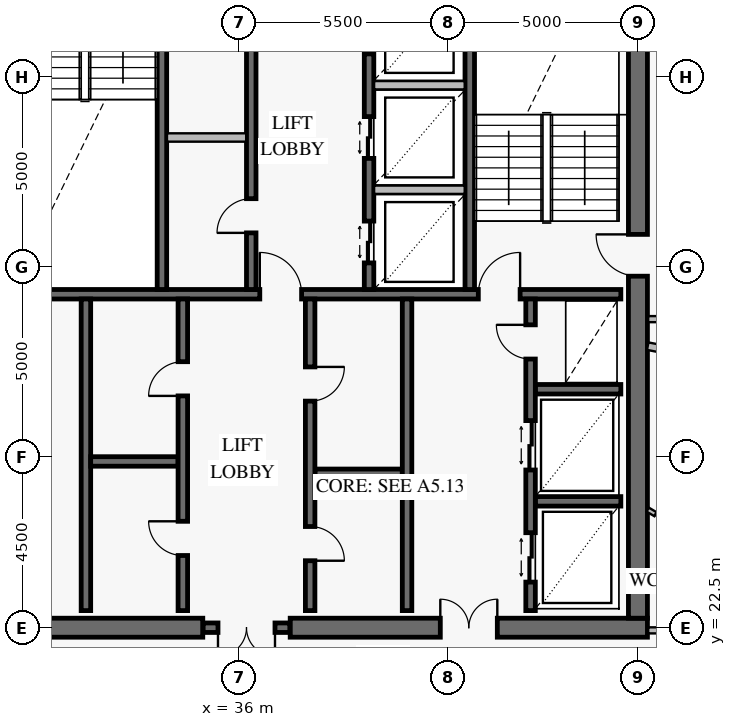
"""IFC4 building model, lengths in metres.
Left out: names, types, materials, properties, quantities, classifications, styles, units other than length and angle.
Written with IfcOpenShell. Run it as: python <this file> out.ifc"""

import sys

from ifc_helpers import new_model, si_unit, direction, frame, frame_2d, origin, place, context, subcontext, project, spatial, rectangle, extrude, element, fill, save


model = new_model("IFC4")
c1 = context("Model", 3, precision=1e-05, world=origin(), true_north=direction((0.0, 1.0)))
c2 = subcontext(c1, "Body", "Model", "MODEL_VIEW")
j1 = project(units=[si_unit("LENGTHUNIT", "METRE"), si_unit("PLANEANGLEUNIT", "RADIAN")], contexts=[c1])
p1 = place(None, origin())
s1 = spatial("IfcSite", under=j1, at=p1, CompositionType="ELEMENT")
p2 = place(p1, origin())
s2 = spatial("IfcBuilding", under=s1, at=p2, CompositionType="ELEMENT")
p3 = place(p2, frame((0.0, 0.0, 331.0)))
s3 = spatial("IfcBuildingStorey", under=s2, at=p3, CompositionType="ELEMENT", Elevation=331.0)
p4 = place(p3, frame((25.25, 22.5, 0.0), z_axis=(0.0, 0.0, 1.0), x_axis=(1.0, 0.0, 0.0)))
e1 = element("IfcWall", 1, at=p4, inside=s3, PredefinedType="SHEAR", context=c2, shape_type="SweptSolid", body=[
    extrude(rectangle(XDim=9.8, YDim=0.5, at=frame_2d((4.9, 0.0))), origin(), (0.0, 0.0, 1.0), 3.8),
])
p5 = place(p4, frame((4.15, 0.0, 0.0)))
e2 = element("IfcOpeningElement", 2, at=p5, cuts=e1, PredefinedType="OPENING", context=c2, shape_type="SweptSolid", body=[
    extrude(rectangle(XDim=1.5, YDim=2.15, at=frame_2d((0.75, 1.075))), frame((0.0, 0.262, 0.0), z_axis=(0.0, -1.0, 0.0), x_axis=(1.0, 0.0, 0.0)), (0.0, 0.0, 1.0), 0.524),
])
p6 = place(p3, frame((37.35, 22.5, 0.0), z_axis=(0.0, 0.0, 1.0), x_axis=(1.0, 0.0, 0.0)))
e3 = element("IfcWall", 3, at=p6, inside=s3, PredefinedType="SHEAR", context=c2, shape_type="SweptSolid", body=[
    extrude(rectangle(XDim=9.4, YDim=0.5, at=frame_2d((4.7, 0.0))), origin(), (0.0, 0.0, 1.0), 3.8),
])
p7 = place(p6, frame((3.95, 0.0, 0.0)))
e4 = element("IfcOpeningElement", 4, at=p7, cuts=e3, PredefinedType="OPENING", context=c2, shape_type="SweptSolid", body=[
    extrude(rectangle(XDim=1.5, YDim=2.15, at=frame_2d((0.75, 1.075))), frame((0.0, 0.262, 0.0), z_axis=(0.0, -1.0, 0.0), x_axis=(1.0, 0.0, 0.0)), (0.0, 0.0, 1.0), 0.524),
])
p8 = place(p3, frame((46.5, 22.75, 0.0), z_axis=(0.0, 0.0, 1.0), x_axis=(0.0, 1.0, 0.0)))
e5 = element("IfcWall", 5, at=p8, inside=s3, PredefinedType="SHEAR", context=c2, shape_type="SweptSolid", body=[
    extrude(rectangle(XDim=18.5, YDim=0.5, at=frame_2d((9.25, 0.0))), origin(), (0.0, 0.0, 1.0), 3.8),
])
p9 = place(p8, frame((9.0, 0.0, 0.0)))
e6 = element("IfcOpeningElement", 6, at=p9, cuts=e5, PredefinedType="OPENING", context=c2, shape_type="SweptSolid", body=[
    extrude(rectangle(XDim=1.1, YDim=2.15, at=frame_2d((0.55, 1.075))), frame((0.0, 0.262, 0.0), z_axis=(0.0, -1.0, 0.0), x_axis=(1.0, 0.0, 0.0)), (0.0, 0.0, 1.0), 0.524),
])
p10 = place(p3, frame((35.06, 22.5, 0.0), z_axis=(0.0, 0.0, 1.0), x_axis=(1.0, 0.0, 0.0)))
e7 = element("IfcWall", 7, at=p10, inside=s3, PredefinedType="SOLIDWALL", context=c2, shape_type="SweptSolid", body=[
    extrude(rectangle(XDim=2.28, YDim=0.25, at=frame_2d((1.14, 0.0))), origin(), (0.0, 0.0, 1.0), 3.8),
])
p11 = place(p10, frame((0.39, 0.0, 0.0)))
e8 = element("IfcOpeningElement", 8, at=p11, cuts=e7, PredefinedType="OPENING", context=c2, shape_type="SweptSolid", body=[
    extrude(rectangle(XDim=1.5, YDim=2.15, at=frame_2d((0.75, 1.075))), frame((0.0, 0.137, 0.0), z_axis=(0.0, -1.0, 0.0), x_axis=(1.0, 0.0, 0.0)), (0.0, 0.0, 1.0), 0.274),
])
p12 = place(p3, frame((25.95, 31.275, 0.0), z_axis=(0.0, 0.0, 1.0), x_axis=(1.0, 0.0, 0.0)))
e9 = element("IfcWall", 9, at=p12, inside=s3, PredefinedType="SOLIDWALL", context=c2, shape_type="SweptSolid", body=[
    extrude(rectangle(XDim=20.1, YDim=0.25, at=frame_2d((10.05, 0.0))), origin(), (0.0, 0.0, 1.0), 3.8),
])
p13 = place(p12, frame((2.6, 0.0, 0.0)))
e10 = element("IfcOpeningElement", 10, at=p13, cuts=e9, PredefinedType="OPENING", context=c2, shape_type="SweptSolid", body=[
    extrude(rectangle(XDim=1.1, YDim=2.15, at=frame_2d((0.55, 1.075))), frame((0.0, 0.137, 0.0), z_axis=(0.0, -1.0, 0.0), x_axis=(1.0, 0.0, 0.0)), (0.0, 0.0, 1.0), 0.274),
])
p14 = place(p12, frame((10.6, 0.0, 0.0)))
e11 = element("IfcOpeningElement", 11, at=p14, cuts=e9, PredefinedType="OPENING", context=c2, shape_type="SweptSolid", body=[
    extrude(rectangle(XDim=1.1, YDim=2.15, at=frame_2d((0.55, 1.075))), frame((0.0, 0.137, 0.0), z_axis=(0.0, -1.0, 0.0), x_axis=(1.0, 0.0, 0.0)), (0.0, 0.0, 1.0), 0.274),
])
p15 = place(p12, frame((16.35, 0.0, 0.0)))
e12 = element("IfcOpeningElement", 12, at=p15, cuts=e9, PredefinedType="OPENING", context=c2, shape_type="SweptSolid", body=[
    extrude(rectangle(XDim=1.1, YDim=2.15, at=frame_2d((0.55, 1.075))), frame((0.0, 0.137, 0.0), z_axis=(0.0, -1.0, 0.0), x_axis=(1.0, 0.0, 0.0)), (0.0, 0.0, 1.0), 0.274),
])
for number, where, z_axis, x_axis in (
    (13, (33.975, 31.4, 0.0), (0.0, 0.0, 1.0), (0.0, 1.0, 0.0)),
    (14, (42.075, 31.4, 0.0), (0.0, 0.0, 1.0), (0.0, 1.0, 0.0)),
):
    element("IfcWall", number, at=place(p3, frame(where, z_axis=z_axis, x_axis=x_axis)), inside=s3, PredefinedType="SOLIDWALL", context=c2, shape_type="SweptSolid", body=[
        extrude(rectangle(XDim=9.7, YDim=0.25, at=frame_2d((4.85, 0.0))), origin(), (0.0, 0.0, 1.0), 3.8),
    ])
p16 = place(p3, frame((36.325, 31.4, 0.0), z_axis=(0.0, 0.0, 1.0), x_axis=(0.0, 1.0, 0.0)))
e15 = element("IfcWall", 15, at=p16, inside=s3, PredefinedType="SOLIDWALL", context=c2, shape_type="SweptSolid", body=[
    extrude(rectangle(XDim=9.65, YDim=0.25, at=frame_2d((4.825, 0.0))), origin(), (0.0, 0.0, 1.0), 3.8),
])
p17 = place(p16, frame((1.49, 0.0, 0.0)))
e16 = element("IfcOpeningElement", 16, at=p17, cuts=e15, PredefinedType="OPENING", context=c2, shape_type="SweptSolid", body=[
    extrude(rectangle(XDim=0.9, YDim=2.1, at=frame_2d((0.45, 1.05))), frame((0.0, 0.137, 0.0), z_axis=(0.0, -1.0, 0.0), x_axis=(1.0, 0.0, 0.0)), (0.0, 0.0, 1.0), 0.274),
])
p18 = place(p16, frame((6.41, 0.0, 0.0)))
e17 = element("IfcOpeningElement", 17, at=p18, cuts=e15, PredefinedType="OPENING", context=c2, shape_type="SweptSolid", body=[
    extrude(rectangle(XDim=0.9, YDim=2.1, at=frame_2d((0.45, 1.05))), frame((0.0, 0.137, 0.0), z_axis=(0.0, -1.0, 0.0), x_axis=(1.0, 0.0, 0.0)), (0.0, 0.0, 1.0), 0.274),
])
p19 = place(p3, frame((39.425, 31.4, 0.0), z_axis=(0.0, 0.0, 1.0), x_axis=(0.0, 1.0, 0.0)))
e18 = element("IfcWall", 18, at=p19, inside=s3, PredefinedType="SOLIDWALL", context=c2, shape_type="SweptSolid", body=[
    extrude(rectangle(XDim=9.65, YDim=0.25, at=frame_2d((4.825, 0.0))), origin(), (0.0, 0.0, 1.0), 3.8),
])
p20 = place(p19, frame((0.7, 0.0, 0.0)))
e19 = element("IfcOpeningElement", 19, at=p20, cuts=e18, PredefinedType="OPENING", context=c2, shape_type="SweptSolid", body=[
    extrude(rectangle(XDim=1.1, YDim=2.2, at=frame_2d((0.55, 1.1))), frame((0.0, 0.137, 0.0), z_axis=(0.0, -1.0, 0.0), x_axis=(1.0, 0.0, 0.0)), (0.0, 0.0, 1.0), 0.274),
])
p21 = place(p19, frame((3.45, 0.0, 0.0)))
e20 = element("IfcOpeningElement", 20, at=p21, cuts=e18, PredefinedType="OPENING", context=c2, shape_type="SweptSolid", body=[
    extrude(rectangle(XDim=1.1, YDim=2.2, at=frame_2d((0.55, 1.1))), frame((0.0, 0.137, 0.0), z_axis=(0.0, -1.0, 0.0), x_axis=(1.0, 0.0, 0.0)), (0.0, 0.0, 1.0), 0.274),
])
p22 = place(p19, frame((6.2, 0.0, 0.0)))
e21 = element("IfcOpeningElement", 21, at=p22, cuts=e18, PredefinedType="OPENING", context=c2, shape_type="SweptSolid", body=[
    extrude(rectangle(XDim=1.1, YDim=2.2, at=frame_2d((0.55, 1.1))), frame((0.0, 0.137, 0.0), z_axis=(0.0, -1.0, 0.0), x_axis=(1.0, 0.0, 0.0)), (0.0, 0.0, 1.0), 0.274),
])
p23 = place(p19, frame((8.47, 0.0, 0.0)))
e22 = element("IfcOpeningElement", 22, at=p23, cuts=e18, PredefinedType="OPENING", context=c2, shape_type="SweptSolid", body=[
    extrude(rectangle(XDim=0.9, YDim=2.1, at=frame_2d((0.45, 1.05))), frame((0.0, 0.137, 0.0), z_axis=(0.0, -1.0, 0.0), x_axis=(1.0, 0.0, 0.0)), (0.0, 0.0, 1.0), 0.274),
])
p24 = place(p3, frame((31.975, 22.95, 0.0), z_axis=(0.0, 0.0, 1.0), x_axis=(0.0, 1.0, 0.0)))
e23 = element("IfcWall", 23, at=p24, inside=s3, PredefinedType="SOLIDWALL", context=c2, shape_type="SweptSolid", body=[
    extrude(rectangle(XDim=8.2, YDim=0.25, at=frame_2d((4.1, 0.0))), origin(), (0.0, 0.0, 1.0), 3.8),
])
p25 = place(p3, frame((32.1, 26.875, 0.0), z_axis=(0.0, 0.0, 1.0), x_axis=(1.0, 0.0, 0.0)))
e24 = element("IfcWall", 24, at=p25, inside=s3, PredefinedType="SOLIDWALL", context=c2, shape_type="SweptSolid", body=[
    extrude(rectangle(XDim=2.3, YDim=0.25, at=frame_2d((1.15, 0.0))), origin(), (0.0, 0.0, 1.0), 3.8),
])
p26 = place(p3, frame((34.525, 22.95, 0.0), z_axis=(0.0, 0.0, 1.0), x_axis=(0.0, 1.0, 0.0)))
e25 = element("IfcWall", 25, at=p26, inside=s3, PredefinedType="SOLIDWALL", context=c2, shape_type="SweptSolid", body=[
    extrude(rectangle(XDim=8.2, YDim=0.25, at=frame_2d((4.1, 0.0))), origin(), (0.0, 0.0, 1.0), 3.8),
])
p27 = place(p26, frame((1.45, 0.0, 0.0)))
e26 = element("IfcOpeningElement", 26, at=p27, cuts=e25, PredefinedType="OPENING", context=c2, shape_type="SweptSolid", body=[
    extrude(rectangle(XDim=0.9, YDim=2.1, at=frame_2d((0.45, 1.05))), frame((0.0, 0.137, 0.0), z_axis=(0.0, -1.0, 0.0), x_axis=(1.0, 0.0, 0.0)), (0.0, 0.0, 1.0), 0.274),
])
p28 = place(p26, frame((5.65, 0.0, 0.0)))
e27 = element("IfcOpeningElement", 27, at=p28, cuts=e25, PredefinedType="OPENING", context=c2, shape_type="SweptSolid", body=[
    extrude(rectangle(XDim=0.9, YDim=2.1, at=frame_2d((0.45, 1.05))), frame((0.0, 0.137, 0.0), z_axis=(0.0, -1.0, 0.0), x_axis=(1.0, 0.0, 0.0)), (0.0, 0.0, 1.0), 0.274),
])
p29 = place(p3, frame((38.0, 26.55, 0.0), z_axis=(0.0, 0.0, 1.0), x_axis=(1.0, 0.0, 0.0)))
e28 = element("IfcWall", 28, at=p29, inside=s3, PredefinedType="SOLIDWALL", context=c2, shape_type="SweptSolid", body=[
    extrude(rectangle(XDim=2.3, YDim=0.25, at=frame_2d((1.15, 0.0))), origin(), (0.0, 0.0, 1.0), 3.8),
])
p30 = place(p3, frame((37.875, 22.95, 0.0), z_axis=(0.0, 0.0, 1.0), x_axis=(0.0, 1.0, 0.0)))
e29 = element("IfcWall", 29, at=p30, inside=s3, PredefinedType="SOLIDWALL", context=c2, shape_type="SweptSolid", body=[
    extrude(rectangle(XDim=8.2, YDim=0.25, at=frame_2d((4.1, 0.0))), origin(), (0.0, 0.0, 1.0), 3.8),
])
p31 = place(p30, frame((1.312, 0.0, 0.0)))
e30 = element("IfcOpeningElement", 30, at=p31, cuts=e29, PredefinedType="OPENING", context=c2, shape_type="SweptSolid", body=[
    extrude(rectangle(XDim=0.9, YDim=2.1, at=frame_2d((0.45, 1.05))), frame((0.0, 0.137, 0.0), z_axis=(0.0, -1.0, 0.0), x_axis=(1.0, 0.0, 0.0)), (0.0, 0.0, 1.0), 0.274),
])
p32 = place(p30, frame((5.512, 0.0, 0.0)))
e31 = element("IfcOpeningElement", 31, at=p32, cuts=e29, PredefinedType="OPENING", context=c2, shape_type="SweptSolid", body=[
    extrude(rectangle(XDim=0.9, YDim=2.1, at=frame_2d((0.45, 1.05))), frame((0.0, 0.137, 0.0), z_axis=(0.0, -1.0, 0.0), x_axis=(1.0, 0.0, 0.0)), (0.0, 0.0, 1.0), 0.274),
])
p33 = place(p3, frame((40.425, 22.95, 0.0), z_axis=(0.0, 0.0, 1.0), x_axis=(0.0, 1.0, 0.0)))
e32 = element("IfcWall", 32, at=p33, inside=s3, PredefinedType="SOLIDWALL", context=c2, shape_type="SweptSolid", body=[
    extrude(rectangle(XDim=8.2, YDim=0.25, at=frame_2d((4.1, 0.0))), origin(), (0.0, 0.0, 1.0), 3.8),
])
for number, where, z_axis, x_axis in (
    (33, (43.8, 25.825, 0.0), (0.0, 0.0, 1.0), (1.0, 0.0, 0.0)),
    (34, (43.8, 28.775, 0.0), (0.0, 0.0, 1.0), (1.0, 0.0, 0.0)),
):
    element("IfcWall", number, at=place(p3, frame(where, z_axis=z_axis, x_axis=x_axis)), inside=s3, PredefinedType="SOLIDWALL", context=c2, shape_type="SweptSolid", body=[
        extrude(rectangle(XDim=2.25, YDim=0.25, at=frame_2d((1.125, 0.0))), origin(), (0.0, 0.0, 1.0), 3.8),
    ])
p34 = place(p3, frame((43.675, 22.95, 0.0), z_axis=(0.0, 0.0, 1.0), x_axis=(0.0, 1.0, 0.0)))
e35 = element("IfcWall", 35, at=p34, inside=s3, PredefinedType="SOLIDWALL", context=c2, shape_type="SweptSolid", body=[
    extrude(rectangle(XDim=8.2, YDim=0.25, at=frame_2d((4.1, 0.0))), origin(), (0.0, 0.0, 1.0), 3.8),
])
p35 = place(p34, frame((0.75, 0.0, 0.0)))
e36 = element("IfcOpeningElement", 36, at=p35, cuts=e35, PredefinedType="OPENING", context=c2, shape_type="SweptSolid", body=[
    extrude(rectangle(XDim=1.3, YDim=2.3, at=frame_2d((0.65, 1.15))), frame((0.0, 0.137, 0.0), z_axis=(0.0, -1.0, 0.0), x_axis=(1.0, 0.0, 0.0)), (0.0, 0.0, 1.0), 0.274),
])
p36 = place(p34, frame((3.7, 0.0, 0.0)))
e37 = element("IfcOpeningElement", 37, at=p36, cuts=e35, PredefinedType="OPENING", context=c2, shape_type="SweptSolid", body=[
    extrude(rectangle(XDim=1.3, YDim=2.3, at=frame_2d((0.65, 1.15))), frame((0.0, 0.137, 0.0), z_axis=(0.0, -1.0, 0.0), x_axis=(1.0, 0.0, 0.0)), (0.0, 0.0, 1.0), 0.274),
])
p37 = place(p34, frame((6.62, 0.0, 0.0)))
e38 = element("IfcOpeningElement", 38, at=p37, cuts=e35, PredefinedType="OPENING", context=c2, shape_type="SweptSolid", body=[
    extrude(rectangle(XDim=0.9, YDim=2.1, at=frame_2d((0.45, 1.05))), frame((0.0, 0.137, 0.0), z_axis=(0.0, -1.0, 0.0), x_axis=(1.0, 0.0, 0.0)), (0.0, 0.0, 1.0), 0.274),
])
p38 = place(p3, frame((46.758, 25.607, 0.0), z_axis=(0.0, 0.0, 1.0), x_axis=(0.859597506205, -0.51097174807, 0.0)))
e39 = element("IfcWall", 39, at=p38, inside=s3, PredefinedType="PARTITIONING", context=c2, shape_type="SweptSolid", body=[
    extrude(rectangle(XDim=1.693, YDim=0.12, at=frame_2d((0.847, 0.0))), origin(), (0.0, 0.0, 1.0), 3.55),
])
p39 = place(p38, frame((0.239, 0.0, 0.0)))
e40 = element("IfcOpeningElement", 40, at=p39, cuts=e39, PredefinedType="OPENING", context=c2, shape_type="SweptSolid", body=[
    extrude(rectangle(XDim=0.9, YDim=2.1, at=frame_2d((0.45, 1.05))), frame((0.0, 0.072, 0.0), z_axis=(0.0, -1.0, 0.0), x_axis=(1.0, 0.0, 0.0)), (0.0, 0.0, 1.0), 0.144),
])
p40 = place(p3, frame((46.77, 30.62, 0.0), z_axis=(0.0, 0.0, 1.0), x_axis=(1.0, 0.0, 0.0)))
e41 = element("IfcWall", 41, at=p40, inside=s3, PredefinedType="PARTITIONING", context=c2, shape_type="SweptSolid", body=[
    extrude(rectangle(XDim=2.029, YDim=0.16, at=frame_2d((1.015, 0.0))), origin(), (0.0, 0.0, 1.0), 3.55),
])
p41 = place(p40, frame((0.49, 0.0, 0.0)))
e42 = element("IfcOpeningElement", 42, at=p41, cuts=e41, PredefinedType="OPENING", context=c2, shape_type="SweptSolid", body=[
    extrude(rectangle(XDim=1.05, YDim=2.15, at=frame_2d((0.525, 1.075))), frame((0.0, 0.092, 0.0), z_axis=(0.0, -1.0, 0.0), x_axis=(1.0, 0.0, 0.0)), (0.0, 0.0, 1.0), 0.184),
])
p42 = place(p3, frame((34.108, 35.4, 0.0), z_axis=(0.0, 0.0, 1.0), x_axis=(1.0, 0.0, 0.0)))
e43 = element("IfcWall", 43, at=p42, inside=s3, PredefinedType="PARTITIONING", context=c2, shape_type="SweptSolid", body=[
    extrude(rectangle(XDim=2.084, YDim=0.22, at=frame_2d((1.042, 0.0))), origin(), (0.0, 0.0, 1.0), 3.55),
])
for number, where, z_axis, x_axis in (
    (44, (39.558, 34.025, 0.0), (0.0, 0.0, 1.0), (1.0, 0.0, 0.0)),
    (45, (39.558, 36.775, 0.0), (0.0, 0.0, 1.0), (1.0, 0.0, 0.0)),
):
    element("IfcWall", number, at=place(p3, frame(where, z_axis=z_axis, x_axis=x_axis)), inside=s3, PredefinedType="PARTITIONING", context=c2, shape_type="SweptSolid", body=[
        extrude(rectangle(XDim=2.384, YDim=0.22, at=frame_2d((1.192, 0.0))), origin(), (0.0, 0.0, 1.0), 3.55),
    ])
p43 = place(p3, frame((46.758, 29.909, 0.0), z_axis=(0.0, 0.0, 1.0), x_axis=(0.981626953462, -0.190810178544, 0.0)))
e46 = element("IfcWall", 46, at=p43, inside=s3, PredefinedType="PARTITIONING", context=c2, shape_type="SweptSolid", body=[
    extrude(rectangle(XDim=14.502, YDim=0.2, at=frame_2d((7.251, 0.0))), origin(), (0.0, 0.0, 1.0), 2.97),
])
p44 = place(p3, frame((48.8, 22.43, 0.0), z_axis=(0.0, 0.0, 1.0), x_axis=(-1.0, 0.0, 0.0)))
e47 = element("IfcWall", 47, at=p44, inside=s3, PredefinedType="PARTITIONING", context=c2, shape_type="SweptSolid", body=[
    extrude(rectangle(XDim=2.03, YDim=0.16, at=frame_2d((1.015, 0.0))), origin(), (0.0, 0.0, 1.0), 3.55),
])
p45 = place(p9, origin())
e48 = element("IfcDoor", 48, at=p45, inside=s3, OperationType="SINGLE_SWING_RIGHT", PredefinedType="USERDEFINED", context=c2, shape_type="SweptSolid", body=[
    extrude(rectangle(XDim=1.1, YDim=2.15, at=frame_2d((0.55, 1.075))), frame((0.0, 0.025, 0.0), z_axis=(0.0, -1.0, 0.0), x_axis=(1.0, 0.0, 0.0)), (0.0, 0.0, 1.0), 0.05),
])
fill(e6, e48)
p46 = place(p7, origin())
e49 = element("IfcDoor", 49, at=p46, inside=s3, OperationType="DOUBLE_DOOR_SINGLE_SWING", PredefinedType="DOOR", context=c2, shape_type="SweptSolid", body=[
    extrude(rectangle(XDim=1.5, YDim=2.15, at=frame_2d((0.75, 1.075))), frame((0.0, 0.025, 0.0), z_axis=(0.0, -1.0, 0.0), x_axis=(1.0, 0.0, 0.0)), (0.0, 0.0, 1.0), 0.05),
])
fill(e4, e49)
p47 = place(p11, frame((1.5, 0.0, 0.0), z_axis=(0.0, 0.0, 1.0), x_axis=(-1.0, 0.0, 0.0)))
e50 = element("IfcDoor", 50, at=p47, inside=s3, OperationType="DOUBLE_DOOR_SINGLE_SWING", PredefinedType="DOOR", context=c2, shape_type="SweptSolid", body=[
    extrude(rectangle(XDim=1.5, YDim=2.15, at=frame_2d((0.75, 1.075))), frame((0.0, 0.025, 0.0), z_axis=(0.0, -1.0, 0.0), x_axis=(1.0, 0.0, 0.0)), (0.0, 0.0, 1.0), 0.05),
])
fill(e8, e50)
p48 = place(p14, origin())
e51 = element("IfcDoor", 51, at=p48, inside=s3, OperationType="SINGLE_SWING_LEFT", PredefinedType="USERDEFINED", context=c2, shape_type="SweptSolid", body=[
    extrude(rectangle(XDim=1.1, YDim=2.15, at=frame_2d((0.55, 1.075))), frame((0.0, 0.025, 0.0), z_axis=(0.0, -1.0, 0.0), x_axis=(1.0, 0.0, 0.0)), (0.0, 0.0, 1.0), 0.05),
])
fill(e11, e51)
p49 = place(p15, origin())
e52 = element("IfcDoor", 52, at=p49, inside=s3, OperationType="SINGLE_SWING_RIGHT", PredefinedType="USERDEFINED", context=c2, shape_type="SweptSolid", body=[
    extrude(rectangle(XDim=1.1, YDim=2.15, at=frame_2d((0.55, 1.075))), frame((0.0, 0.025, 0.0), z_axis=(0.0, -1.0, 0.0), x_axis=(1.0, 0.0, 0.0)), (0.0, 0.0, 1.0), 0.05),
])
fill(e12, e52)
p50 = place(p17, origin())
e53 = element("IfcDoor", 53, at=p50, inside=s3, OperationType="SINGLE_SWING_LEFT", PredefinedType="DOOR", context=c2, shape_type="SweptSolid", body=[
    extrude(rectangle(XDim=0.9, YDim=2.1, at=frame_2d((0.45, 1.05))), frame((0.0, 0.025, 0.0), z_axis=(0.0, -1.0, 0.0), x_axis=(1.0, 0.0, 0.0)), (0.0, 0.0, 1.0), 0.05),
])
fill(e16, e53)
p51 = place(p20, origin())
e54 = element("IfcDoor", 54, at=p51, inside=s3, OperationType="DOUBLE_DOOR_SLIDING", PredefinedType="DOOR", context=c2, shape_type="SweptSolid", body=[
    extrude(rectangle(XDim=1.1, YDim=2.2, at=frame_2d((0.55, 1.1))), frame((0.0, 0.025, 0.0), z_axis=(0.0, -1.0, 0.0), x_axis=(1.0, 0.0, 0.0)), (0.0, 0.0, 1.0), 0.05),
])
fill(e19, e54)
p52 = place(p21, origin())
e55 = element("IfcDoor", 55, at=p52, inside=s3, OperationType="DOUBLE_DOOR_SLIDING", PredefinedType="DOOR", context=c2, shape_type="SweptSolid", body=[
    extrude(rectangle(XDim=1.1, YDim=2.2, at=frame_2d((0.55, 1.1))), frame((0.0, 0.025, 0.0), z_axis=(0.0, -1.0, 0.0), x_axis=(1.0, 0.0, 0.0)), (0.0, 0.0, 1.0), 0.05),
])
fill(e20, e55)
p53 = place(p22, origin())
e56 = element("IfcDoor", 56, at=p53, inside=s3, OperationType="DOUBLE_DOOR_SLIDING", PredefinedType="DOOR", context=c2, shape_type="SweptSolid", body=[
    extrude(rectangle(XDim=1.1, YDim=2.2, at=frame_2d((0.55, 1.1))), frame((0.0, 0.025, 0.0), z_axis=(0.0, -1.0, 0.0), x_axis=(1.0, 0.0, 0.0)), (0.0, 0.0, 1.0), 0.05),
])
fill(e21, e56)
p54 = place(p27, origin())
e57 = element("IfcDoor", 57, at=p54, inside=s3, OperationType="SINGLE_SWING_RIGHT", PredefinedType="DOOR", context=c2, shape_type="SweptSolid", body=[
    extrude(rectangle(XDim=0.9, YDim=2.1, at=frame_2d((0.45, 1.05))), frame((0.0, 0.025, 0.0), z_axis=(0.0, -1.0, 0.0), x_axis=(1.0, 0.0, 0.0)), (0.0, 0.0, 1.0), 0.05),
])
fill(e26, e57)
p55 = place(p28, origin())
e58 = element("IfcDoor", 58, at=p55, inside=s3, OperationType="SINGLE_SWING_LEFT", PredefinedType="DOOR", context=c2, shape_type="SweptSolid", body=[
    extrude(rectangle(XDim=0.9, YDim=2.1, at=frame_2d((0.45, 1.05))), frame((0.0, 0.025, 0.0), z_axis=(0.0, -1.0, 0.0), x_axis=(1.0, 0.0, 0.0)), (0.0, 0.0, 1.0), 0.05),
])
fill(e27, e58)
p56 = place(p31, frame((0.9, 0.0, 0.0), z_axis=(0.0, 0.0, 1.0), x_axis=(-1.0, 0.0, 0.0)))
e59 = element("IfcDoor", 59, at=p56, inside=s3, OperationType="SINGLE_SWING_RIGHT", PredefinedType="DOOR", context=c2, shape_type="SweptSolid", body=[
    extrude(rectangle(XDim=0.9, YDim=2.1, at=frame_2d((0.45, 1.05))), frame((0.0, 0.025, 0.0), z_axis=(0.0, -1.0, 0.0), x_axis=(1.0, 0.0, 0.0)), (0.0, 0.0, 1.0), 0.05),
])
fill(e30, e59)
p57 = place(p32, frame((0.9, 0.0, 0.0), z_axis=(0.0, 0.0, 1.0), x_axis=(-1.0, 0.0, 0.0)))
e60 = element("IfcDoor", 60, at=p57, inside=s3, OperationType="SINGLE_SWING_LEFT", PredefinedType="DOOR", context=c2, shape_type="SweptSolid", body=[
    extrude(rectangle(XDim=0.9, YDim=2.1, at=frame_2d((0.45, 1.05))), frame((0.0, 0.025, 0.0), z_axis=(0.0, -1.0, 0.0), x_axis=(1.0, 0.0, 0.0)), (0.0, 0.0, 1.0), 0.05),
])
fill(e31, e60)
p58 = place(p35, origin())
e61 = element("IfcDoor", 61, at=p58, inside=s3, OperationType="DOUBLE_DOOR_SLIDING", PredefinedType="DOOR", context=c2, shape_type="SweptSolid", body=[
    extrude(rectangle(XDim=1.3, YDim=2.3, at=frame_2d((0.65, 1.15))), frame((0.0, 0.025, 0.0), z_axis=(0.0, -1.0, 0.0), x_axis=(1.0, 0.0, 0.0)), (0.0, 0.0, 1.0), 0.05),
])
fill(e36, e61)
p59 = place(p36, origin())
e62 = element("IfcDoor", 62, at=p59, inside=s3, OperationType="DOUBLE_DOOR_SLIDING", PredefinedType="DOOR", context=c2, shape_type="SweptSolid", body=[
    extrude(rectangle(XDim=1.3, YDim=2.3, at=frame_2d((0.65, 1.15))), frame((0.0, 0.025, 0.0), z_axis=(0.0, -1.0, 0.0), x_axis=(1.0, 0.0, 0.0)), (0.0, 0.0, 1.0), 0.05),
])
fill(e37, e62)
p60 = place(p37, origin())
e63 = element("IfcDoor", 63, at=p60, inside=s3, OperationType="SINGLE_SWING_RIGHT", PredefinedType="DOOR", context=c2, shape_type="SweptSolid", body=[
    extrude(rectangle(XDim=0.9, YDim=2.1, at=frame_2d((0.45, 1.05))), frame((0.0, 0.025, 0.0), z_axis=(0.0, -1.0, 0.0), x_axis=(1.0, 0.0, 0.0)), (0.0, 0.0, 1.0), 0.05),
])
fill(e38, e63)
p61 = place(p39, origin())
e64 = element("IfcDoor", 64, at=p61, inside=s3, OperationType="SINGLE_SWING_RIGHT", PredefinedType="DOOR", context=c2, shape_type="SweptSolid", body=[
    extrude(rectangle(XDim=0.9, YDim=2.1, at=frame_2d((0.45, 1.05))), frame((0.0, 0.025, 0.0), z_axis=(0.0, -1.0, 0.0), x_axis=(1.0, 0.0, 0.0)), (0.0, 0.0, 1.0), 0.05),
])
fill(e40, e64)
save(model, sys.argv[1])
